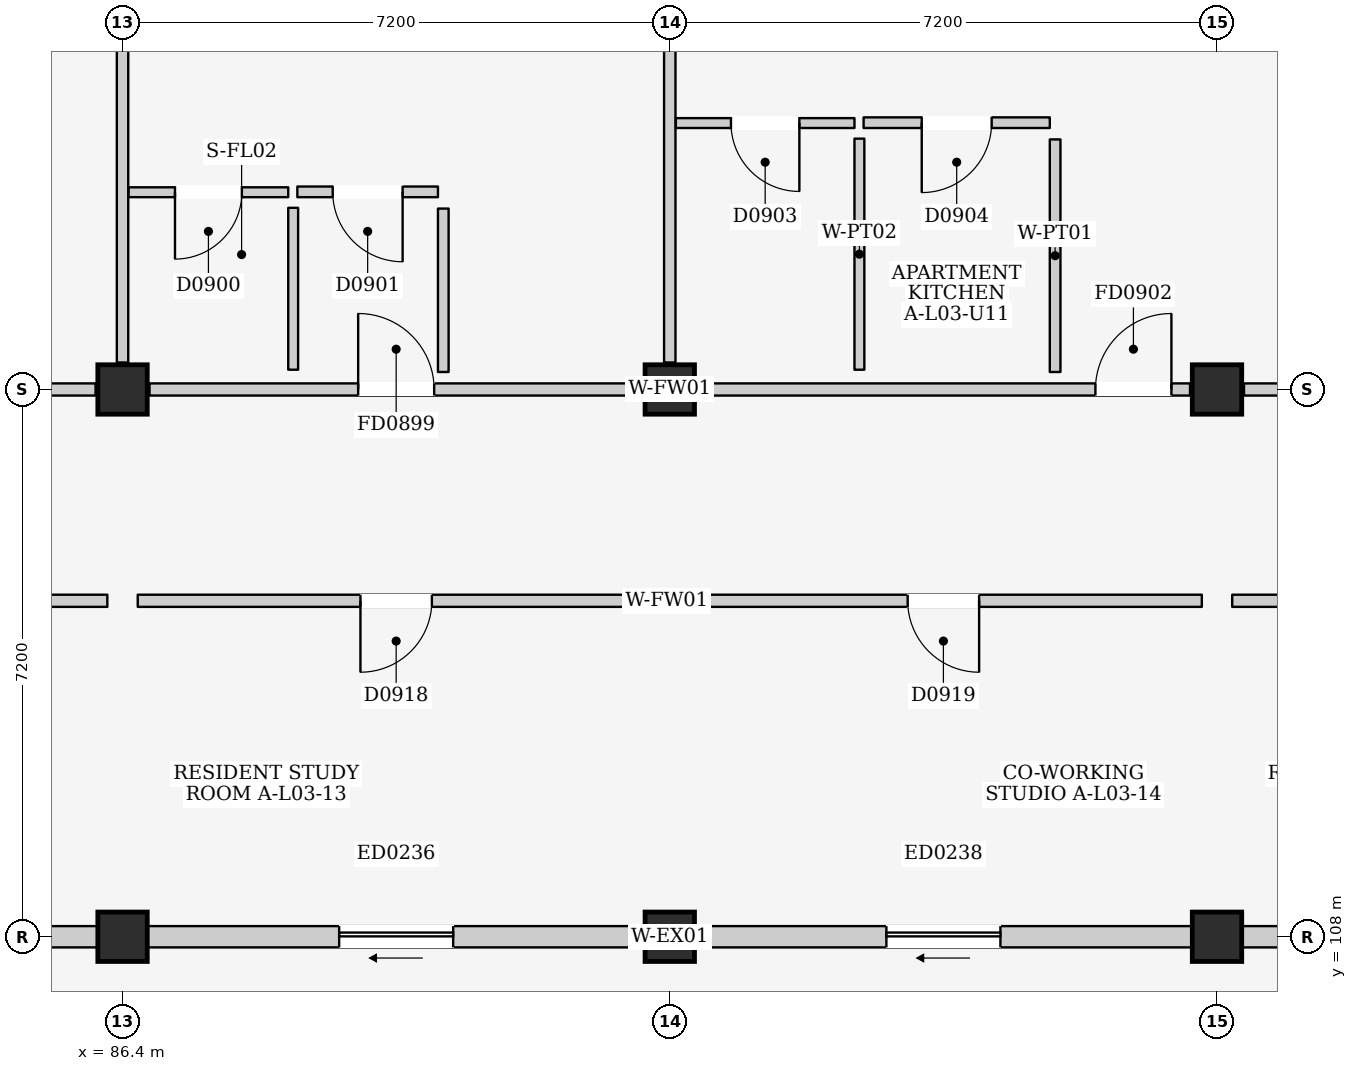
"""IFC4 building model, lengths in metres.
Left out: names, types, materials, properties, quantities, classifications, styles, units other than length and angle.
Written with IfcOpenShell. Run it as: python <this file> out.ifc"""

import sys

from ifc_helpers import new_model, si_unit, direction, frame, frame_2d, origin, origin_2d, place, context, subcontext, project, spatial, rectangle, extrude, element, fill, save


model = new_model("IFC4")
c1 = context("Model", 3, precision=1e-05, world=origin(), true_north=direction((0.0, 1.0)))
c2 = subcontext(c1, "Body", "Model", "MODEL_VIEW")
j1 = project(units=[si_unit("LENGTHUNIT", "METRE"), si_unit("PLANEANGLEUNIT", "RADIAN")], contexts=[c1])
p1 = place(None, origin())
s1 = spatial("IfcSite", under=j1, at=p1, CompositionType="ELEMENT")
p2 = place(p1, origin())
s2 = spatial("IfcBuilding", under=s1, at=p2, CompositionType="ELEMENT")
p3 = place(p2, frame((0.0, 0.0, 12.2)))
s3 = spatial("IfcBuildingStorey", under=s2, at=p3, CompositionType="ELEMENT", Elevation=12.2)
for number, where, z_axis, x_axis in (
    (1, (86.4, 108.0, 0.0), (0.0, 0.0, 1.0), (1.0, 0.0, 0.0)),
    (2, (86.4, 115.2, 0.0), (0.0, 0.0, 1.0), (1.0, 0.0, 0.0)),
    (3, (93.6, 108.0, 0.0), (0.0, 0.0, 1.0), (1.0, 0.0, 0.0)),
    (4, (93.6, 115.2, 0.0), (0.0, 0.0, 1.0), (1.0, 0.0, 0.0)),
    (5, (100.8, 108.0, 0.0), (0.0, 0.0, 1.0), (1.0, 0.0, 0.0)),
    (6, (100.8, 115.2, 0.0), (0.0, 0.0, 1.0), (1.0, 0.0, 0.0)),
):
    element("IfcColumn", number, at=place(p3, frame(where, z_axis=z_axis, x_axis=x_axis)), inside=s3, PredefinedType="COLUMN", context=c2, shape_type="SweptSolid", body=[
        extrude(rectangle(XDim=0.65, YDim=0.65, at=origin_2d()), origin(), (0.0, 0.0, 1.0), 3.2),
    ])
p4 = place(p3, frame((79.525, 108.0, 0.0), z_axis=(0.0, 0.0, 1.0), x_axis=(1.0, 0.0, 0.0)))
e7 = element("IfcWall", 7, at=p4, inside=s3, PredefinedType="ELEMENTEDWALL", context=c2, shape_type="SweptSolid", body=[
    extrude(rectangle(XDim=6.55, YDim=0.28, at=frame_2d((3.275, 0.0))), origin(), (0.0, 0.0, 1.0), 2.315),
])
p5 = place(p4, frame((2.525, 0.0, 0.0)))
e8 = element("IfcOpeningElement", 8, at=p5, cuts=e7, PredefinedType="OPENING", context=c2, shape_type="SweptSolid", body=[
    extrude(rectangle(XDim=1.5, YDim=2.12, at=frame_2d((0.75, 1.06))), frame((0.0, 0.155, 0.0), z_axis=(0.0, -1.0, 0.0), x_axis=(1.0, 0.0, 0.0)), (0.0, 0.0, 1.0), 0.31),
])
p6 = place(p3, frame((86.725, 108.0, 0.0), z_axis=(0.0, 0.0, 1.0), x_axis=(1.0, 0.0, 0.0)))
e9 = element("IfcWall", 9, at=p6, inside=s3, PredefinedType="ELEMENTEDWALL", context=c2, shape_type="SweptSolid", body=[
    extrude(rectangle(XDim=6.55, YDim=0.28, at=frame_2d((3.275, 0.0))), origin(), (0.0, 0.0, 1.0), 2.315),
])
p7 = place(p6, frame((2.525, 0.0, 0.0)))
e10 = element("IfcOpeningElement", 10, at=p7, cuts=e9, PredefinedType="OPENING", context=c2, shape_type="SweptSolid", body=[
    extrude(rectangle(XDim=1.5, YDim=2.12, at=frame_2d((0.75, 1.06))), frame((0.0, 0.155, 0.0), z_axis=(0.0, -1.0, 0.0), x_axis=(1.0, 0.0, 0.0)), (0.0, 0.0, 1.0), 0.31),
])
p8 = place(p3, frame((93.925, 108.0, 0.0), z_axis=(0.0, 0.0, 1.0), x_axis=(1.0, 0.0, 0.0)))
e11 = element("IfcWall", 11, at=p8, inside=s3, PredefinedType="ELEMENTEDWALL", context=c2, shape_type="SweptSolid", body=[
    extrude(rectangle(XDim=6.55, YDim=0.28, at=frame_2d((3.275, 0.0))), origin(), (0.0, 0.0, 1.0), 2.315),
])
p9 = place(p8, frame((2.525, 0.0, 0.0)))
e12 = element("IfcOpeningElement", 12, at=p9, cuts=e11, PredefinedType="OPENING", context=c2, shape_type="SweptSolid", body=[
    extrude(rectangle(XDim=1.5, YDim=2.12, at=frame_2d((0.75, 1.06))), frame((0.0, 0.155, 0.0), z_axis=(0.0, -1.0, 0.0), x_axis=(1.0, 0.0, 0.0)), (0.0, 0.0, 1.0), 0.31),
])
p10 = place(p3, frame((101.125, 108.0, 0.0), z_axis=(0.0, 0.0, 1.0), x_axis=(1.0, 0.0, 0.0)))
e13 = element("IfcWall", 13, at=p10, inside=s3, PredefinedType="ELEMENTEDWALL", context=c2, shape_type="SweptSolid", body=[
    extrude(rectangle(XDim=6.55, YDim=0.28, at=frame_2d((3.275, 0.0))), origin(), (0.0, 0.0, 1.0), 2.315),
])
p11 = place(p10, frame((2.525, 0.0, 0.0)))
e14 = element("IfcOpeningElement", 14, at=p11, cuts=e13, PredefinedType="OPENING", context=c2, shape_type="SweptSolid", body=[
    extrude(rectangle(XDim=1.5, YDim=2.12, at=frame_2d((0.75, 1.06))), frame((0.0, 0.155, 0.0), z_axis=(0.0, -1.0, 0.0), x_axis=(1.0, 0.0, 0.0)), (0.0, 0.0, 1.0), 0.31),
])
p12 = place(p3, frame((79.555, 115.2, 0.0), z_axis=(0.0, 0.0, 1.0), x_axis=(1.0, 0.0, 0.0)))
e15 = element("IfcWall", 15, at=p12, inside=s3, PredefinedType="PARTITIONING", context=c2, shape_type="SweptSolid", body=[
    extrude(rectangle(XDim=6.49, YDim=0.16, at=frame_2d((3.245, 0.0))), origin(), (0.0, 0.0, 1.0), 2.315),
])
p13 = place(p12, frame((2.745, 0.0, 0.0)))
e16 = element("IfcOpeningElement", 16, at=p13, cuts=e15, PredefinedType="OPENING", context=c2, shape_type="SweptSolid", body=[
    extrude(rectangle(XDim=1.0, YDim=2.15, at=frame_2d((0.5, 1.075))), frame((0.0, 0.095, 0.0), z_axis=(0.0, -1.0, 0.0), x_axis=(1.0, 0.0, 0.0)), (0.0, 0.0, 1.0), 0.19),
])
p14 = place(p3, frame((86.4, 115.555, 0.0), z_axis=(0.0, 0.0, 1.0), x_axis=(0.0, 1.0, 0.0)))
e17 = element("IfcWall", 17, at=p14, inside=s3, PredefinedType="PARTITIONING", context=c2, shape_type="SweptSolid", body=[
    extrude(rectangle(XDim=6.49, YDim=0.15, at=frame_2d((3.245, 0.0))), origin(), (0.0, 0.0, 1.0), 2.415),
])
p15 = place(p3, frame((86.755, 115.2, 0.0), z_axis=(0.0, 0.0, 1.0), x_axis=(1.0, 0.0, 0.0)))
e18 = element("IfcWall", 18, at=p15, inside=s3, PredefinedType="PARTITIONING", context=c2, shape_type="SweptSolid", body=[
    extrude(rectangle(XDim=6.49, YDim=0.16, at=frame_2d((3.245, 0.0))), origin(), (0.0, 0.0, 1.0), 2.315),
])
p16 = place(p15, frame((2.745, 0.0, 0.0)))
e19 = element("IfcOpeningElement", 19, at=p16, cuts=e18, PredefinedType="OPENING", context=c2, shape_type="SweptSolid", body=[
    extrude(rectangle(XDim=1.0, YDim=2.15, at=frame_2d((0.5, 1.075))), frame((0.0, 0.095, 0.0), z_axis=(0.0, -1.0, 0.0), x_axis=(1.0, 0.0, 0.0)), (0.0, 0.0, 1.0), 0.19),
])
p17 = place(p3, frame((93.6, 115.555, 0.0), z_axis=(0.0, 0.0, 1.0), x_axis=(0.0, 1.0, 0.0)))
e20 = element("IfcWall", 20, at=p17, inside=s3, PredefinedType="PARTITIONING", context=c2, shape_type="SweptSolid", body=[
    extrude(rectangle(XDim=6.49, YDim=0.15, at=frame_2d((3.245, 0.0))), origin(), (0.0, 0.0, 1.0), 2.415),
])
p18 = place(p3, frame((86.48, 117.795, 0.0), z_axis=(0.0, 0.0, 1.0), x_axis=(1.0, 0.0, 0.0)))
e21 = element("IfcWall", 21, at=p18, inside=s3, PredefinedType="PARTITIONING", context=c2, shape_type="SweptSolid", body=[
    extrude(rectangle(XDim=2.1, YDim=0.13, at=frame_2d((1.05, 0.0))), origin(), (0.0, 0.0, 1.0), 2.98),
])
p19 = place(p18, frame((0.61, 0.0, 0.0)))
e22 = element("IfcOpeningElement", 22, at=p19, cuts=e21, PredefinedType="OPENING", context=c2, shape_type="SweptSolid", body=[
    extrude(rectangle(XDim=0.88, YDim=2.1, at=frame_2d((0.44, 1.05))), frame((0.0, 0.08, 0.0), z_axis=(0.0, -1.0, 0.0), x_axis=(1.0, 0.0, 0.0)), (0.0, 0.0, 1.0), 0.16),
])
p20 = place(p3, frame((88.645, 115.46, 0.0), z_axis=(0.0, 0.0, 1.0), x_axis=(0.0, 1.0, 0.0)))
e23 = element("IfcWall", 23, at=p20, inside=s3, PredefinedType="PARTITIONING", context=c2, shape_type="SweptSolid", body=[
    extrude(rectangle(XDim=2.13, YDim=0.13, at=frame_2d((1.065, 0.0))), origin(), (0.0, 0.0, 1.0), 2.98),
])
p21 = place(p3, frame((88.7, 117.8, 0.0), z_axis=(0.0, 0.0, 1.0), x_axis=(1.0, 0.0, 0.0)))
e24 = element("IfcWall", 24, at=p21, inside=s3, PredefinedType="PARTITIONING", context=c2, shape_type="SweptSolid", body=[
    extrude(rectangle(XDim=1.85, YDim=0.14, at=frame_2d((0.925, 0.0))), origin(), (0.0, 0.0, 1.0), 2.98),
])
p22 = place(p21, frame((0.465, 0.0, 0.0)))
e25 = element("IfcOpeningElement", 25, at=p22, cuts=e24, PredefinedType="OPENING", context=c2, shape_type="SweptSolid", body=[
    extrude(rectangle(XDim=0.92, YDim=2.1, at=frame_2d((0.46, 1.05))), frame((0.0, 0.085, 0.0), z_axis=(0.0, -1.0, 0.0), x_axis=(1.0, 0.0, 0.0)), (0.0, 0.0, 1.0), 0.17),
])
p23 = place(p3, frame((90.62, 115.43, 0.0), z_axis=(0.0, 0.0, 1.0), x_axis=(0.0, 1.0, 0.0)))
e26 = element("IfcWall", 26, at=p23, inside=s3, PredefinedType="PARTITIONING", context=c2, shape_type="SweptSolid", body=[
    extrude(rectangle(XDim=2.15, YDim=0.14, at=frame_2d((1.075, 0.0))), origin(), (0.0, 0.0, 1.0), 2.98),
])
p24 = place(p3, frame((93.955, 115.2, 0.0), z_axis=(0.0, 0.0, 1.0), x_axis=(1.0, 0.0, 0.0)))
e27 = element("IfcWall", 27, at=p24, inside=s3, PredefinedType="PARTITIONING", context=c2, shape_type="SweptSolid", body=[
    extrude(rectangle(XDim=6.49, YDim=0.16, at=frame_2d((3.245, 0.0))), origin(), (0.0, 0.0, 1.0), 2.315),
])
p25 = place(p24, frame((5.245, 0.0, 0.0)))
e28 = element("IfcOpeningElement", 28, at=p25, cuts=e27, PredefinedType="OPENING", context=c2, shape_type="SweptSolid", body=[
    extrude(rectangle(XDim=1.0, YDim=2.15, at=frame_2d((0.5, 1.075))), frame((0.0, 0.095, 0.0), z_axis=(0.0, -1.0, 0.0), x_axis=(1.0, 0.0, 0.0)), (0.0, 0.0, 1.0), 0.19),
])
p26 = place(p3, frame((101.155, 115.2, 0.0), z_axis=(0.0, 0.0, 1.0), x_axis=(1.0, 0.0, 0.0)))
e29 = element("IfcWall", 29, at=p26, inside=s3, PredefinedType="PARTITIONING", context=c2, shape_type="SweptSolid", body=[
    extrude(rectangle(XDim=6.49, YDim=0.16, at=frame_2d((3.245, 0.0))), origin(), (0.0, 0.0, 1.0), 2.315),
])
p27 = place(p3, frame((93.68, 118.705, 0.0), z_axis=(0.0, 0.0, 1.0), x_axis=(1.0, 0.0, 0.0)))
e30 = element("IfcWall", 30, at=p27, inside=s3, PredefinedType="PARTITIONING", context=c2, shape_type="SweptSolid", body=[
    extrude(rectangle(XDim=2.35, YDim=0.13, at=frame_2d((1.175, 0.0))), origin(), (0.0, 0.0, 1.0), 2.98),
])
p28 = place(p27, frame((0.725, 0.0, 0.0)))
e31 = element("IfcOpeningElement", 31, at=p28, cuts=e30, PredefinedType="OPENING", context=c2, shape_type="SweptSolid", body=[
    extrude(rectangle(XDim=0.9, YDim=2.1, at=frame_2d((0.45, 1.05))), frame((0.0, 0.08, 0.0), z_axis=(0.0, -1.0, 0.0), x_axis=(1.0, 0.0, 0.0)), (0.0, 0.0, 1.0), 0.16),
])
p29 = place(p3, frame((96.095, 115.46, 0.0), z_axis=(0.0, 0.0, 1.0), x_axis=(0.0, 1.0, 0.0)))
e32 = element("IfcWall", 32, at=p29, inside=s3, PredefinedType="PARTITIONING", context=c2, shape_type="SweptSolid", body=[
    extrude(rectangle(XDim=3.04, YDim=0.13, at=frame_2d((1.52, 0.0))), origin(), (0.0, 0.0, 1.0), 2.98),
])
p30 = place(p3, frame((96.15, 118.71, 0.0), z_axis=(0.0, 0.0, 1.0), x_axis=(1.0, 0.0, 0.0)))
e33 = element("IfcWall", 33, at=p30, inside=s3, PredefinedType="PARTITIONING", context=c2, shape_type="SweptSolid", body=[
    extrude(rectangle(XDim=2.45, YDim=0.14, at=frame_2d((1.225, 0.0))), origin(), (0.0, 0.0, 1.0), 2.98),
])
p31 = place(p30, frame((0.765, 0.0, 0.0)))
e34 = element("IfcOpeningElement", 34, at=p31, cuts=e33, PredefinedType="OPENING", context=c2, shape_type="SweptSolid", body=[
    extrude(rectangle(XDim=0.92, YDim=2.1, at=frame_2d((0.46, 1.05))), frame((0.0, 0.085, 0.0), z_axis=(0.0, -1.0, 0.0), x_axis=(1.0, 0.0, 0.0)), (0.0, 0.0, 1.0), 0.17),
])
p32 = place(p3, frame((98.67, 115.43, 0.0), z_axis=(0.0, 0.0, 1.0), x_axis=(0.0, 1.0, 0.0)))
e35 = element("IfcWall", 35, at=p32, inside=s3, PredefinedType="PARTITIONING", context=c2, shape_type="SweptSolid", body=[
    extrude(rectangle(XDim=3.06, YDim=0.14, at=frame_2d((1.53, 0.0))), origin(), (0.0, 0.0, 1.0), 2.98),
])
p33 = place(p3, frame((79.4, 112.42, 0.0), z_axis=(0.0, 0.0, 1.0), x_axis=(1.0, 0.0, 0.0)))
e36 = element("IfcWall", 36, at=p33, inside=s3, PredefinedType="PARTITIONING", context=c2, shape_type="SweptSolid", body=[
    extrude(rectangle(XDim=6.8, YDim=0.16, at=frame_2d((3.4, 0.0))), origin(), (0.0, 0.0, 1.0), 2.98),
])
p34 = place(p33, frame((2.93, 0.0, 0.0)))
e37 = element("IfcOpeningElement", 37, at=p34, cuts=e36, PredefinedType="OPENING", context=c2, shape_type="SweptSolid", body=[
    extrude(rectangle(XDim=0.94, YDim=2.12, at=frame_2d((0.47, 1.06))), frame((0.0, 0.095, 0.0), z_axis=(0.0, -1.0, 0.0), x_axis=(1.0, 0.0, 0.0)), (0.0, 0.0, 1.0), 0.19),
])
p35 = place(p3, frame((86.6, 112.42, 0.0), z_axis=(0.0, 0.0, 1.0), x_axis=(1.0, 0.0, 0.0)))
e38 = element("IfcWall", 38, at=p35, inside=s3, PredefinedType="PARTITIONING", context=c2, shape_type="SweptSolid", body=[
    extrude(rectangle(XDim=6.8, YDim=0.16, at=frame_2d((3.4, 0.0))), origin(), (0.0, 0.0, 1.0), 2.98),
])
p36 = place(p35, frame((2.93, 0.0, 0.0)))
e39 = element("IfcOpeningElement", 39, at=p36, cuts=e38, PredefinedType="OPENING", context=c2, shape_type="SweptSolid", body=[
    extrude(rectangle(XDim=0.94, YDim=2.12, at=frame_2d((0.47, 1.06))), frame((0.0, 0.095, 0.0), z_axis=(0.0, -1.0, 0.0), x_axis=(1.0, 0.0, 0.0)), (0.0, 0.0, 1.0), 0.19),
])
p37 = place(p3, frame((93.8, 112.42, 0.0), z_axis=(0.0, 0.0, 1.0), x_axis=(1.0, 0.0, 0.0)))
e40 = element("IfcWall", 40, at=p37, inside=s3, PredefinedType="PARTITIONING", context=c2, shape_type="SweptSolid", body=[
    extrude(rectangle(XDim=6.8, YDim=0.16, at=frame_2d((3.4, 0.0))), origin(), (0.0, 0.0, 1.0), 2.98),
])
p38 = place(p37, frame((2.93, 0.0, 0.0)))
e41 = element("IfcOpeningElement", 41, at=p38, cuts=e40, PredefinedType="OPENING", context=c2, shape_type="SweptSolid", body=[
    extrude(rectangle(XDim=0.94, YDim=2.12, at=frame_2d((0.47, 1.06))), frame((0.0, 0.095, 0.0), z_axis=(0.0, -1.0, 0.0), x_axis=(1.0, 0.0, 0.0)), (0.0, 0.0, 1.0), 0.19),
])
p39 = place(p3, frame((101.0, 112.42, 0.0), z_axis=(0.0, 0.0, 1.0), x_axis=(1.0, 0.0, 0.0)))
e42 = element("IfcWall", 42, at=p39, inside=s3, PredefinedType="PARTITIONING", context=c2, shape_type="SweptSolid", body=[
    extrude(rectangle(XDim=6.8, YDim=0.16, at=frame_2d((3.4, 0.0))), origin(), (0.0, 0.0, 1.0), 2.98),
])
p40 = place(p39, frame((2.93, 0.0, 0.0)))
e43 = element("IfcOpeningElement", 43, at=p40, cuts=e42, PredefinedType="OPENING", context=c2, shape_type="SweptSolid", body=[
    extrude(rectangle(XDim=0.94, YDim=2.12, at=frame_2d((0.47, 1.06))), frame((0.0, 0.095, 0.0), z_axis=(0.0, -1.0, 0.0), x_axis=(1.0, 0.0, 0.0)), (0.0, 0.0, 1.0), 0.19),
])
p41 = place(p7, frame((1.5, 0.0, 0.0), z_axis=(0.0, 0.0, 1.0), x_axis=(-1.0, 0.0, 0.0)))
e44 = element("IfcDoor", 44, at=p41, inside=s3, OperationType="SLIDING_TO_LEFT", PredefinedType="DOOR", context=c2, shape_type="SweptSolid", body=[
    extrude(rectangle(XDim=1.5, YDim=2.12, at=frame_2d((0.75, 1.06))), frame((0.0, 0.025, 0.0), z_axis=(0.0, -1.0, 0.0), x_axis=(1.0, 0.0, 0.0)), (0.0, 0.0, 1.0), 0.05),
])
fill(e10, e44)
p42 = place(p9, frame((1.5, 0.0, 0.0), z_axis=(0.0, 0.0, 1.0), x_axis=(-1.0, 0.0, 0.0)))
e45 = element("IfcDoor", 45, at=p42, inside=s3, OperationType="SLIDING_TO_LEFT", PredefinedType="DOOR", context=c2, shape_type="SweptSolid", body=[
    extrude(rectangle(XDim=1.5, YDim=2.12, at=frame_2d((0.75, 1.06))), frame((0.0, 0.025, 0.0), z_axis=(0.0, -1.0, 0.0), x_axis=(1.0, 0.0, 0.0)), (0.0, 0.0, 1.0), 0.05),
])
fill(e12, e45)
p43 = place(p16, origin())
e46 = element("IfcDoor", 46, at=p43, inside=s3, OperationType="SINGLE_SWING_LEFT", PredefinedType="DOOR", context=c2, shape_type="SweptSolid", body=[
    extrude(rectangle(XDim=1.0, YDim=2.15, at=frame_2d((0.5, 1.075))), frame((0.0, 0.025, 0.0), z_axis=(0.0, -1.0, 0.0), x_axis=(1.0, 0.0, 0.0)), (0.0, 0.0, 1.0), 0.05),
])
fill(e19, e46)
p44 = place(p19, frame((0.88, 0.0, 0.0), z_axis=(0.0, 0.0, 1.0), x_axis=(-1.0, 0.0, 0.0)))
e47 = element("IfcDoor", 47, at=p44, inside=s3, OperationType="SINGLE_SWING_RIGHT", PredefinedType="DOOR", context=c2, shape_type="SweptSolid", body=[
    extrude(rectangle(XDim=0.88, YDim=2.1, at=frame_2d((0.44, 1.05))), frame((0.0, 0.025, 0.0), z_axis=(0.0, -1.0, 0.0), x_axis=(1.0, 0.0, 0.0)), (0.0, 0.0, 1.0), 0.05),
])
fill(e22, e47)
p45 = place(p22, frame((0.92, 0.0, 0.0), z_axis=(0.0, 0.0, 1.0), x_axis=(-1.0, 0.0, 0.0)))
e48 = element("IfcDoor", 48, at=p45, inside=s3, OperationType="SINGLE_SWING_LEFT", PredefinedType="DOOR", context=c2, shape_type="SweptSolid", body=[
    extrude(rectangle(XDim=0.92, YDim=2.1, at=frame_2d((0.46, 1.05))), frame((0.0, 0.025, 0.0), z_axis=(0.0, -1.0, 0.0), x_axis=(1.0, 0.0, 0.0)), (0.0, 0.0, 1.0), 0.05),
])
fill(e25, e48)
p46 = place(p25, origin())
e49 = element("IfcDoor", 49, at=p46, inside=s3, OperationType="SINGLE_SWING_RIGHT", PredefinedType="DOOR", context=c2, shape_type="SweptSolid", body=[
    extrude(rectangle(XDim=1.0, YDim=2.15, at=frame_2d((0.5, 1.075))), frame((0.0, 0.025, 0.0), z_axis=(0.0, -1.0, 0.0), x_axis=(1.0, 0.0, 0.0)), (0.0, 0.0, 1.0), 0.05),
])
fill(e28, e49)
p47 = place(p28, frame((0.9, 0.0, 0.0), z_axis=(0.0, 0.0, 1.0), x_axis=(-1.0, 0.0, 0.0)))
e50 = element("IfcDoor", 50, at=p47, inside=s3, OperationType="SINGLE_SWING_LEFT", PredefinedType="DOOR", context=c2, shape_type="SweptSolid", body=[
    extrude(rectangle(XDim=0.9, YDim=2.1, at=frame_2d((0.45, 1.05))), frame((0.0, 0.025, 0.0), z_axis=(0.0, -1.0, 0.0), x_axis=(1.0, 0.0, 0.0)), (0.0, 0.0, 1.0), 0.05),
])
fill(e31, e50)
p48 = place(p31, frame((0.92, 0.0, 0.0), z_axis=(0.0, 0.0, 1.0), x_axis=(-1.0, 0.0, 0.0)))
e51 = element("IfcDoor", 51, at=p48, inside=s3, OperationType="SINGLE_SWING_RIGHT", PredefinedType="DOOR", context=c2, shape_type="SweptSolid", body=[
    extrude(rectangle(XDim=0.92, YDim=2.1, at=frame_2d((0.46, 1.05))), frame((0.0, 0.025, 0.0), z_axis=(0.0, -1.0, 0.0), x_axis=(1.0, 0.0, 0.0)), (0.0, 0.0, 1.0), 0.05),
])
fill(e34, e51)
p49 = place(p36, frame((0.94, 0.0, 0.0), z_axis=(0.0, 0.0, 1.0), x_axis=(-1.0, 0.0, 0.0)))
e52 = element("IfcDoor", 52, at=p49, inside=s3, OperationType="SINGLE_SWING_RIGHT", PredefinedType="DOOR", context=c2, shape_type="SweptSolid", body=[
    extrude(rectangle(XDim=0.94, YDim=2.12, at=frame_2d((0.47, 1.06))), frame((0.0, 0.025, 0.0), z_axis=(0.0, -1.0, 0.0), x_axis=(1.0, 0.0, 0.0)), (0.0, 0.0, 1.0), 0.05),
])
fill(e39, e52)
p50 = place(p38, frame((0.94, 0.0, 0.0), z_axis=(0.0, 0.0, 1.0), x_axis=(-1.0, 0.0, 0.0)))
e53 = element("IfcDoor", 53, at=p50, inside=s3, OperationType="SINGLE_SWING_LEFT", PredefinedType="DOOR", context=c2, shape_type="SweptSolid", body=[
    extrude(rectangle(XDim=0.94, YDim=2.12, at=frame_2d((0.47, 1.06))), frame((0.0, 0.025, 0.0), z_axis=(0.0, -1.0, 0.0), x_axis=(1.0, 0.0, 0.0)), (0.0, 0.0, 1.0), 0.05),
])
fill(e41, e53)
save(model, sys.argv[1])
